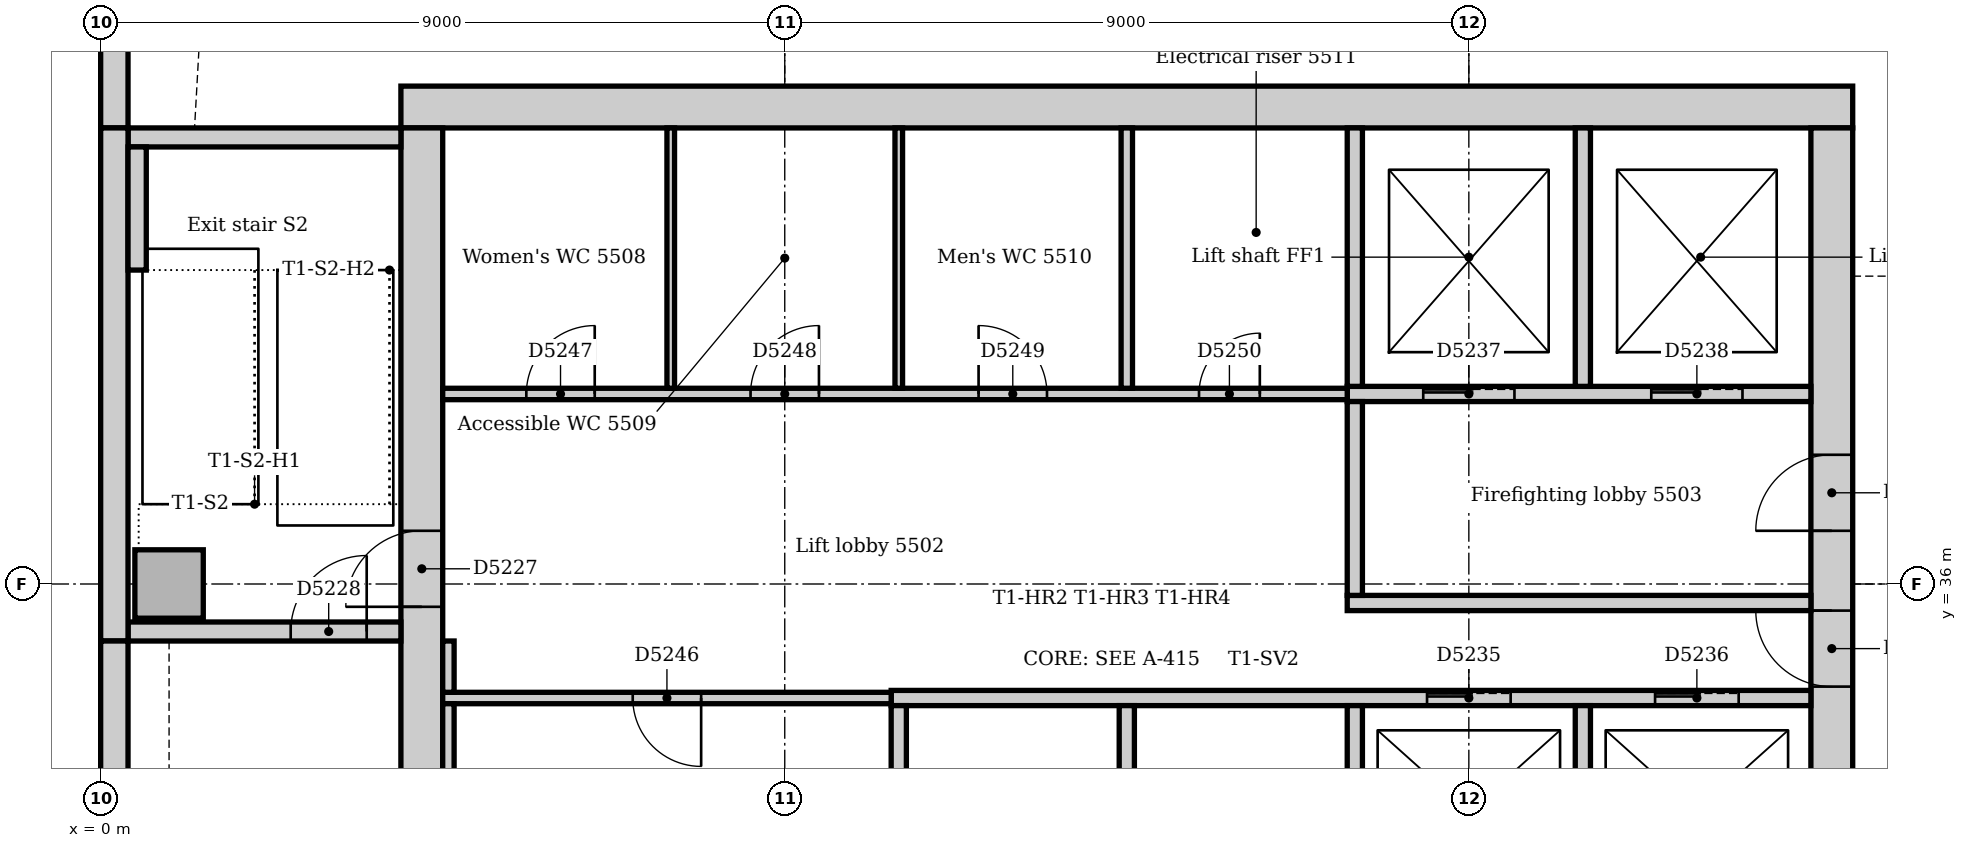
"""IFC4 building model, lengths in metres.
Left out: names, types, materials, properties, quantities, classifications, styles, units other than length and angle.
Written with IfcOpenShell. Run it as: python <this file> out.ifc"""

import sys

from ifc_helpers import new_model, si_unit, direction, frame, frame_2d, origin, origin_2d, place, context, subcontext, project, spatial, rectangle, extrude, element, fill, save


model = new_model("IFC4")
c1 = context("Model", 3, precision=1e-05, world=origin(), true_north=direction((0.0, 1.0)))
c2 = subcontext(c1, "Body", "Model", "MODEL_VIEW")
j1 = project(units=[si_unit("LENGTHUNIT", "METRE"), si_unit("PLANEANGLEUNIT", "RADIAN")], contexts=[c1])
p1 = place(None, origin())
s1 = spatial("IfcSite", under=j1, at=p1, CompositionType="ELEMENT")
p2 = place(p1, origin())
s2 = spatial("IfcBuilding", under=s1, at=p2, CompositionType="ELEMENT")
p3 = place(p2, frame((0.0, 0.0, 230.0)))
s3 = spatial("IfcBuildingStorey", under=s2, at=p3, CompositionType="ELEMENT", Elevation=230.0)
p4 = place(p3, frame((23.05, 42.275, 0.0), z_axis=(0.0, 0.0, 1.0), x_axis=(-1.0, 0.0, 0.0)))
e1 = element("IfcWall", 1, at=p4, inside=s3, PredefinedType="SOLIDWALL", context=c2, shape_type="SweptSolid", body=[
    extrude(rectangle(XDim=19.1, YDim=0.55, at=frame_2d((9.55, 0.0))), origin(), (0.0, 0.0, 1.0), 4.0),
])
p5 = place(p3, frame((22.775, 31.5, 0.0), z_axis=(0.0, 0.0, 1.0), x_axis=(0.0, 1.0, 0.0)))
e2 = element("IfcWall", 2, at=p5, inside=s3, PredefinedType="SOLIDWALL", context=c2, shape_type="SweptSolid", body=[
    extrude(rectangle(XDim=10.5, YDim=0.55, at=frame_2d((5.25, 0.0))), origin(), (0.0, 0.0, 1.0), 4.0),
])
p6 = place(p5, frame((3.15, 0.0, 0.0)))
e3 = element("IfcOpeningElement", 3, at=p6, cuts=e2, PredefinedType="OPENING", context=c2, shape_type="SweptSolid", body=[
    extrude(rectangle(XDim=1.0, YDim=2.1, at=frame_2d((0.5, 1.05))), frame((0.0, 0.285, 0.0), z_axis=(0.0, -1.0, 0.0), x_axis=(1.0, 0.0, 0.0)), (0.0, 0.0, 1.0), 0.57),
])
p7 = place(p5, frame((5.2, 0.0, 0.0)))
e4 = element("IfcOpeningElement", 4, at=p7, cuts=e2, PredefinedType="OPENING", context=c2, shape_type="SweptSolid", body=[
    extrude(rectangle(XDim=1.0, YDim=2.1, at=frame_2d((0.5, 1.05))), frame((0.0, 0.285, 0.0), z_axis=(0.0, -1.0, 0.0), x_axis=(1.0, 0.0, 0.0)), (0.0, 0.0, 1.0), 0.57),
])
p8 = place(p3, frame((4.225, 42.0, 0.0), z_axis=(0.0, 0.0, 1.0), x_axis=(0.0, -1.0, 0.0)))
e5 = element("IfcWall", 5, at=p8, inside=s3, PredefinedType="SOLIDWALL", context=c2, shape_type="SweptSolid", body=[
    extrude(rectangle(XDim=10.5, YDim=0.55, at=frame_2d((5.25, 0.0))), origin(), (0.0, 0.0, 1.0), 4.0),
])
p9 = place(p8, frame((5.3, 0.0, 0.0)))
e6 = element("IfcOpeningElement", 6, at=p9, cuts=e5, PredefinedType="OPENING", context=c2, shape_type="SweptSolid", body=[
    extrude(rectangle(XDim=1.0, YDim=2.1, at=frame_2d((0.5, 1.05))), frame((0.0, 0.285, 0.0), z_axis=(0.0, -1.0, 0.0), x_axis=(1.0, 0.0, 0.0)), (0.0, 0.0, 1.0), 0.57),
])
p10 = place(p3, frame((0.36, 35.375, 0.0), z_axis=(0.0, 0.0, 1.0), x_axis=(1.0, 0.0, 0.0)))
e7 = element("IfcWall", 7, at=p10, inside=s3, PredefinedType="SOLIDWALL", context=c2, shape_type="SweptSolid", body=[
    extrude(rectangle(XDim=3.59, YDim=0.25, at=frame_2d((1.795, 0.0))), origin(), (0.0, 0.0, 1.0), 4.0),
])
p11 = place(p10, frame((2.14, 0.0, 0.0)))
e8 = element("IfcOpeningElement", 8, at=p11, cuts=e7, PredefinedType="OPENING", context=c2, shape_type="SweptSolid", body=[
    extrude(rectangle(XDim=1.0, YDim=2.1, at=frame_2d((0.5, 1.05))), frame((0.0, 0.135, 0.0), z_axis=(0.0, -1.0, 0.0), x_axis=(1.0, 0.0, 0.0)), (0.0, 0.0, 1.0), 0.27),
])
p12 = place(p3, frame((3.95, 41.875, 0.0), z_axis=(0.0, 0.0, 1.0), x_axis=(-1.0, 0.0, 0.0)))
e9 = element("IfcWall", 9, at=p12, inside=s3, PredefinedType="SOLIDWALL", context=c2, shape_type="SweptSolid", body=[
    extrude(rectangle(XDim=3.59, YDim=0.25, at=frame_2d((1.795, 0.0))), origin(), (0.0, 0.0, 1.0), 4.0),
])
p13 = place(p3, frame((0.9, 36.0, 0.0), z_axis=(0.0, 0.0, 1.0), x_axis=(1.0, 0.0, 0.0)))
e10 = element("IfcColumn", 10, at=p13, inside=s3, PredefinedType="COLUMN", context=c2, shape_type="SweptSolid", body=[
    extrude(rectangle(XDim=0.9, YDim=0.9, at=origin_2d()), origin(), (0.0, 0.0, 1.0), 4.0),
])
p14 = place(p3, frame((0.18, 54.257, 0.0), z_axis=(0.0, 0.0, 1.0), x_axis=(0.0, -1.0, 0.0)))
e11 = element("IfcWall", 11, at=p14, inside=s3, PredefinedType="STANDARD", context=c2, shape_type="SweptSolid", body=[
    extrude(rectangle(XDim=12.257, YDim=0.36, at=frame_2d((6.129, 0.0))), origin(), (0.0, 0.0, 1.0), 3.85),
])
p15 = place(p14, frame((3.107, 0.0, 0.9)))
e12 = element("IfcOpeningElement", 12, at=p15, cuts=e11, PredefinedType="OPENING", context=c2, shape_type="SweptSolid", body=[
    extrude(rectangle(XDim=3.3, YDim=1.6, at=frame_2d((1.65, 0.8))), frame((0.0, 0.19, 0.0), z_axis=(0.0, -1.0, 0.0), x_axis=(1.0, 0.0, 0.0)), (0.0, 0.0, 1.0), 0.38),
])
p16 = place(p14, frame((7.607, 0.0, 0.9)))
e13 = element("IfcOpeningElement", 13, at=p16, cuts=e11, PredefinedType="OPENING", context=c2, shape_type="SweptSolid", body=[
    extrude(rectangle(XDim=3.3, YDim=1.6, at=frame_2d((1.65, 0.8))), frame((0.0, 0.19, 0.0), z_axis=(0.0, -1.0, 0.0), x_axis=(1.0, 0.0, 0.0)), (0.0, 0.0, 1.0), 0.38),
])
p17 = place(p3, frame((0.18, 42.0, 0.0), z_axis=(0.0, 0.0, 1.0), x_axis=(0.0, -1.0, 0.0)))
e14 = element("IfcWall", 14, at=p17, inside=s3, PredefinedType="STANDARD", context=c2, shape_type="SweptSolid", body=[
    extrude(rectangle(XDim=6.75, YDim=0.36, at=frame_2d((3.375, 0.0))), origin(), (0.0, 0.0, 1.0), 3.85),
])
p18 = place(p3, frame((0.18, 35.25, 0.0), z_axis=(0.0, 0.0, 1.0), x_axis=(0.0, -1.0, 0.0)))
e15 = element("IfcWall", 15, at=p18, inside=s3, PredefinedType="STANDARD", context=c2, shape_type="SweptSolid", body=[
    extrude(rectangle(XDim=7.5, YDim=0.36, at=frame_2d((3.75, 0.0))), origin(), (0.0, 0.0, 1.0), 3.85),
])
p19 = place(p3, frame((0.48, 40.13, 0.0), z_axis=(0.0, 0.0, 1.0), x_axis=(0.0, 1.0, 0.0)))
e16 = element("IfcWall", 16, at=p19, inside=s3, PredefinedType="STANDARD", context=c2, shape_type="SweptSolid", body=[
    extrude(rectangle(XDim=1.62, YDim=0.24, at=frame_2d((0.81, 0.0))), origin(), (0.0, 0.0, 1.0), 4.0),
])
p20 = place(p3, frame((16.4, 35.75, 0.0), z_axis=(0.0, 0.0, 1.0), x_axis=(1.0, 0.0, 0.0)))
e17 = element("IfcWall", 17, at=p20, inside=s3, PredefinedType="PARTITIONING", context=c2, shape_type="SweptSolid", body=[
    extrude(rectangle(XDim=6.1, YDim=0.2, at=frame_2d((3.05, 0.0))), origin(), (0.0, 0.0, 1.0), 3.85),
])
p21 = place(p3, frame((16.4, 38.5, 0.0), z_axis=(0.0, 0.0, 1.0), x_axis=(1.0, 0.0, 0.0)))
e18 = element("IfcWall", 18, at=p21, inside=s3, PredefinedType="PARTITIONING", context=c2, shape_type="SweptSolid", body=[
    extrude(rectangle(XDim=6.1, YDim=0.2, at=frame_2d((3.05, 0.0))), origin(), (0.0, 0.0, 1.0), 3.85),
])
p22 = place(p21, frame((1.0, 0.0, 0.0)))
e19 = element("IfcOpeningElement", 19, at=p22, cuts=e18, PredefinedType="OPENING", context=c2, shape_type="SweptSolid", body=[
    extrude(rectangle(XDim=1.2, YDim=2.1, at=frame_2d((0.6, 1.05))), frame((0.0, 0.11, 0.0), z_axis=(0.0, -1.0, 0.0), x_axis=(1.0, 0.0, 0.0)), (0.0, 0.0, 1.0), 0.22),
])
p23 = place(p21, frame((4.0, 0.0, 0.0)))
e20 = element("IfcOpeningElement", 20, at=p23, cuts=e18, PredefinedType="OPENING", context=c2, shape_type="SweptSolid", body=[
    extrude(rectangle(XDim=1.2, YDim=2.1, at=frame_2d((0.6, 1.05))), frame((0.0, 0.11, 0.0), z_axis=(0.0, -1.0, 0.0), x_axis=(1.0, 0.0, 0.0)), (0.0, 0.0, 1.0), 0.22),
])
p24 = place(p3, frame((16.5, 35.85, 0.0), z_axis=(0.0, 0.0, 1.0), x_axis=(0.0, 1.0, 0.0)))
e21 = element("IfcWall", 21, at=p24, inside=s3, PredefinedType="PARTITIONING", context=c2, shape_type="SweptSolid", body=[
    extrude(rectangle(XDim=2.55, YDim=0.2, at=frame_2d((1.275, 0.0))), origin(), (0.0, 0.0, 1.0), 3.85),
])
p25 = place(p3, frame((10.4, 34.5, 0.0), z_axis=(0.0, 0.0, 1.0), x_axis=(1.0, 0.0, 0.0)))
e22 = element("IfcWall", 22, at=p25, inside=s3, PredefinedType="PARTITIONING", context=c2, shape_type="SweptSolid", body=[
    extrude(rectangle(XDim=12.1, YDim=0.2, at=frame_2d((6.05, 0.0))), origin(), (0.0, 0.0, 1.0), 3.85),
])
p26 = place(p25, frame((7.05, 0.0, 0.0)))
e23 = element("IfcOpeningElement", 23, at=p26, cuts=e22, PredefinedType="OPENING", context=c2, shape_type="SweptSolid", body=[
    extrude(rectangle(XDim=1.1, YDim=2.1, at=frame_2d((0.55, 1.05))), frame((0.0, 0.11, 0.0), z_axis=(0.0, -1.0, 0.0), x_axis=(1.0, 0.0, 0.0)), (0.0, 0.0, 1.0), 0.22),
])
p27 = place(p25, frame((10.05, 0.0, 0.0)))
e24 = element("IfcOpeningElement", 24, at=p27, cuts=e22, PredefinedType="OPENING", context=c2, shape_type="SweptSolid", body=[
    extrude(rectangle(XDim=1.1, YDim=2.1, at=frame_2d((0.55, 1.05))), frame((0.0, 0.11, 0.0), z_axis=(0.0, -1.0, 0.0), x_axis=(1.0, 0.0, 0.0)), (0.0, 0.0, 1.0), 0.22),
])
for number, where, z_axis, x_axis in (
    (25, (10.5, 31.75, 0.0), (0.0, 0.0, 1.0), (0.0, 1.0, 0.0)),
    (26, (13.5, 31.75, 0.0), (0.0, 0.0, 1.0), (0.0, 1.0, 0.0)),
    (27, (16.5, 31.75, 0.0), (0.0, 0.0, 1.0), (0.0, 1.0, 0.0)),
    (28, (19.5, 31.75, 0.0), (0.0, 0.0, 1.0), (0.0, 1.0, 0.0)),
):
    element("IfcWall", number, at=place(p3, frame(where, z_axis=z_axis, x_axis=x_axis)), inside=s3, PredefinedType="PARTITIONING", context=c2, shape_type="SweptSolid", body=[
        extrude(rectangle(XDim=2.65, YDim=0.2, at=frame_2d((1.325, 0.0))), origin(), (0.0, 0.0, 1.0), 3.85),
    ])
for number, where, z_axis, x_axis in (
    (29, (16.5, 38.6, 0.0), (0.0, 0.0, 1.0), (0.0, 1.0, 0.0)),
    (30, (19.5, 38.6, 0.0), (0.0, 0.0, 1.0), (0.0, 1.0, 0.0)),
):
    element("IfcWall", number, at=place(p3, frame(where, z_axis=z_axis, x_axis=x_axis)), inside=s3, PredefinedType="PARTITIONING", context=c2, shape_type="SweptSolid", body=[
        extrude(rectangle(XDim=3.4, YDim=0.2, at=frame_2d((1.7, 0.0))), origin(), (0.0, 0.0, 1.0), 3.85),
    ])
p28 = place(p3, frame((4.5, 38.5, 0.0), z_axis=(0.0, 0.0, 1.0), x_axis=(1.0, 0.0, 0.0)))
e31 = element("IfcWall", 31, at=p28, inside=s3, PredefinedType="PARTITIONING", context=c2, shape_type="SweptSolid", body=[
    extrude(rectangle(XDim=11.9, YDim=0.15, at=frame_2d((5.95, 0.0))), origin(), (0.0, 0.0, 1.0), 3.85),
])
p29 = place(p28, frame((1.1, 0.0, 0.0)))
e32 = element("IfcOpeningElement", 32, at=p29, cuts=e31, PredefinedType="OPENING", context=c2, shape_type="SweptSolid", body=[
    extrude(rectangle(XDim=0.9, YDim=2.1, at=frame_2d((0.45, 1.05))), frame((0.0, 0.085, 0.0), z_axis=(0.0, -1.0, 0.0), x_axis=(1.0, 0.0, 0.0)), (0.0, 0.0, 1.0), 0.17),
])
p30 = place(p28, frame((4.05, 0.0, 0.0)))
e33 = element("IfcOpeningElement", 33, at=p30, cuts=e31, PredefinedType="OPENING", context=c2, shape_type="SweptSolid", body=[
    extrude(rectangle(XDim=0.9, YDim=2.1, at=frame_2d((0.45, 1.05))), frame((0.0, 0.085, 0.0), z_axis=(0.0, -1.0, 0.0), x_axis=(1.0, 0.0, 0.0)), (0.0, 0.0, 1.0), 0.17),
])
p31 = place(p28, frame((7.05, 0.0, 0.0)))
e34 = element("IfcOpeningElement", 34, at=p31, cuts=e31, PredefinedType="OPENING", context=c2, shape_type="SweptSolid", body=[
    extrude(rectangle(XDim=0.9, YDim=2.1, at=frame_2d((0.45, 1.05))), frame((0.0, 0.085, 0.0), z_axis=(0.0, -1.0, 0.0), x_axis=(1.0, 0.0, 0.0)), (0.0, 0.0, 1.0), 0.17),
])
p32 = place(p28, frame((9.95, 0.0, 0.0)))
e35 = element("IfcOpeningElement", 35, at=p32, cuts=e31, PredefinedType="OPENING", context=c2, shape_type="SweptSolid", body=[
    extrude(rectangle(XDim=0.8, YDim=2.1, at=frame_2d((0.4, 1.05))), frame((0.0, 0.085, 0.0), z_axis=(0.0, -1.0, 0.0), x_axis=(1.0, 0.0, 0.0)), (0.0, 0.0, 1.0), 0.17),
])
p33 = place(p3, frame((4.5, 34.5, 0.0), z_axis=(0.0, 0.0, 1.0), x_axis=(1.0, 0.0, 0.0)))
e36 = element("IfcWall", 36, at=p33, inside=s3, PredefinedType="PARTITIONING", context=c2, shape_type="SweptSolid", body=[
    extrude(rectangle(XDim=5.9, YDim=0.15, at=frame_2d((2.95, 0.0))), origin(), (0.0, 0.0, 1.0), 3.85),
])
p34 = place(p33, frame((2.5, 0.0, 0.0)))
e37 = element("IfcOpeningElement", 37, at=p34, cuts=e36, PredefinedType="OPENING", context=c2, shape_type="SweptSolid", body=[
    extrude(rectangle(XDim=0.9, YDim=2.1, at=frame_2d((0.45, 1.05))), frame((0.0, 0.085, 0.0), z_axis=(0.0, -1.0, 0.0), x_axis=(1.0, 0.0, 0.0)), (0.0, 0.0, 1.0), 0.17),
])
p35 = place(p3, frame((4.575, 34.575, 0.0), z_axis=(0.0, 0.0, 1.0), x_axis=(0.0, 1.0, 0.0)))
e38 = element("IfcWall", 38, at=p35, inside=s3, PredefinedType="PARTITIONING", context=c2, shape_type="SweptSolid", body=[
    extrude(rectangle(XDim=0.675, YDim=0.15, at=frame_2d((0.338, 0.0))), origin(), (0.0, 0.0, 1.0), 3.85),
])
p36 = place(p3, frame((4.575, 31.75, 0.0), z_axis=(0.0, 0.0, 1.0), x_axis=(0.0, 1.0, 0.0)))
e39 = element("IfcWall", 39, at=p36, inside=s3, PredefinedType="PARTITIONING", context=c2, shape_type="SweptSolid", body=[
    extrude(rectangle(XDim=2.675, YDim=0.15, at=frame_2d((1.337, 0.0))), origin(), (0.0, 0.0, 1.0), 3.85),
])
p37 = place(p3, frame((13.5, 38.575, 0.0), z_axis=(0.0, 0.0, 1.0), x_axis=(0.0, 1.0, 0.0)))
e40 = element("IfcWall", 40, at=p37, inside=s3, PredefinedType="PARTITIONING", context=c2, shape_type="SweptSolid", body=[
    extrude(rectangle(XDim=3.425, YDim=0.15, at=frame_2d((1.712, 0.0))), origin(), (0.0, 0.0, 1.0), 3.85),
])
for number, where, z_axis, x_axis in (
    (41, (7.5, 38.575, 0.0), (0.0, 0.0, 1.0), (0.0, 1.0, 0.0)),
    (42, (10.5, 38.575, 0.0), (0.0, 0.0, 1.0), (0.0, 1.0, 0.0)),
):
    element("IfcWall", number, at=place(p3, frame(where, z_axis=z_axis, x_axis=x_axis)), inside=s3, PredefinedType="PARTITIONING", context=c2, shape_type="SweptSolid", body=[
        extrude(rectangle(XDim=3.425, YDim=0.1, at=frame_2d((1.712, 0.0))), origin(), (0.0, 0.0, 1.0), 3.85),
    ])
p38 = place(p9, frame((1.0, 0.0, 0.0), z_axis=(0.0, 0.0, 1.0), x_axis=(-1.0, 0.0, 0.0)))
e43 = element("IfcDoor", 43, at=p38, inside=s3, OperationType="SINGLE_SWING_LEFT", PredefinedType="DOOR", context=c2, shape_type="SweptSolid", body=[
    extrude(rectangle(XDim=1.0, YDim=2.1, at=frame_2d((0.5, 1.05))), frame((0.0, 0.025, 0.0), z_axis=(0.0, -1.0, 0.0), x_axis=(1.0, 0.0, 0.0)), (0.0, 0.0, 1.0), 0.05),
])
fill(e6, e43)
p39 = place(p11, origin())
e44 = element("IfcDoor", 44, at=p39, inside=s3, OperationType="SINGLE_SWING_RIGHT", PredefinedType="DOOR", context=c2, shape_type="SweptSolid", body=[
    extrude(rectangle(XDim=1.0, YDim=2.1, at=frame_2d((0.5, 1.05))), frame((0.0, 0.025, 0.0), z_axis=(0.0, -1.0, 0.0), x_axis=(1.0, 0.0, 0.0)), (0.0, 0.0, 1.0), 0.05),
])
fill(e8, e44)
p40 = place(p26, origin())
e45 = element("IfcDoor", 45, at=p40, inside=s3, OperationType="SLIDING_TO_LEFT", PredefinedType="DOOR", context=c2, shape_type="SweptSolid", body=[
    extrude(rectangle(XDim=1.1, YDim=2.1, at=frame_2d((0.55, 1.05))), frame((0.0, 0.025, 0.0), z_axis=(0.0, -1.0, 0.0), x_axis=(1.0, 0.0, 0.0)), (0.0, 0.0, 1.0), 0.05),
])
fill(e23, e45)
p41 = place(p27, origin())
e46 = element("IfcDoor", 46, at=p41, inside=s3, OperationType="SLIDING_TO_LEFT", PredefinedType="DOOR", context=c2, shape_type="SweptSolid", body=[
    extrude(rectangle(XDim=1.1, YDim=2.1, at=frame_2d((0.55, 1.05))), frame((0.0, 0.025, 0.0), z_axis=(0.0, -1.0, 0.0), x_axis=(1.0, 0.0, 0.0)), (0.0, 0.0, 1.0), 0.05),
])
fill(e24, e46)
p42 = place(p22, origin())
e47 = element("IfcDoor", 47, at=p42, inside=s3, OperationType="SLIDING_TO_LEFT", PredefinedType="DOOR", context=c2, shape_type="SweptSolid", body=[
    extrude(rectangle(XDim=1.2, YDim=2.1, at=frame_2d((0.6, 1.05))), frame((0.0, 0.025, 0.0), z_axis=(0.0, -1.0, 0.0), x_axis=(1.0, 0.0, 0.0)), (0.0, 0.0, 1.0), 0.05),
])
fill(e19, e47)
p43 = place(p23, origin())
e48 = element("IfcDoor", 48, at=p43, inside=s3, OperationType="SLIDING_TO_LEFT", PredefinedType="DOOR", context=c2, shape_type="SweptSolid", body=[
    extrude(rectangle(XDim=1.2, YDim=2.1, at=frame_2d((0.6, 1.05))), frame((0.0, 0.025, 0.0), z_axis=(0.0, -1.0, 0.0), x_axis=(1.0, 0.0, 0.0)), (0.0, 0.0, 1.0), 0.05),
])
fill(e20, e48)
p44 = place(p6, origin())
e49 = element("IfcDoor", 49, at=p44, inside=s3, OperationType="SINGLE_SWING_RIGHT", PredefinedType="DOOR", context=c2, shape_type="SweptSolid", body=[
    extrude(rectangle(XDim=1.0, YDim=2.1, at=frame_2d((0.5, 1.05))), frame((0.0, 0.025, 0.0), z_axis=(0.0, -1.0, 0.0), x_axis=(1.0, 0.0, 0.0)), (0.0, 0.0, 1.0), 0.05),
])
fill(e3, e49)
p45 = place(p7, origin())
e50 = element("IfcDoor", 50, at=p45, inside=s3, OperationType="SINGLE_SWING_LEFT", PredefinedType="DOOR", context=c2, shape_type="SweptSolid", body=[
    extrude(rectangle(XDim=1.0, YDim=2.1, at=frame_2d((0.5, 1.05))), frame((0.0, 0.025, 0.0), z_axis=(0.0, -1.0, 0.0), x_axis=(1.0, 0.0, 0.0)), (0.0, 0.0, 1.0), 0.05),
])
fill(e4, e50)
p46 = place(p34, frame((0.9, 0.0, 0.0), z_axis=(0.0, 0.0, 1.0), x_axis=(-1.0, 0.0, 0.0)))
e51 = element("IfcDoor", 51, at=p46, inside=s3, OperationType="SINGLE_SWING_LEFT", PredefinedType="DOOR", context=c2, shape_type="SweptSolid", body=[
    extrude(rectangle(XDim=0.9, YDim=2.1, at=frame_2d((0.45, 1.05))), frame((0.0, 0.025, 0.0), z_axis=(0.0, -1.0, 0.0), x_axis=(1.0, 0.0, 0.0)), (0.0, 0.0, 1.0), 0.05),
])
fill(e37, e51)
p47 = place(p29, origin())
e52 = element("IfcDoor", 52, at=p47, inside=s3, OperationType="SINGLE_SWING_RIGHT", PredefinedType="DOOR", context=c2, shape_type="SweptSolid", body=[
    extrude(rectangle(XDim=0.9, YDim=2.1, at=frame_2d((0.45, 1.05))), frame((0.0, 0.025, 0.0), z_axis=(0.0, -1.0, 0.0), x_axis=(1.0, 0.0, 0.0)), (0.0, 0.0, 1.0), 0.05),
])
fill(e32, e52)
p48 = place(p30, origin())
e53 = element("IfcDoor", 53, at=p48, inside=s3, OperationType="SINGLE_SWING_RIGHT", PredefinedType="DOOR", context=c2, shape_type="SweptSolid", body=[
    extrude(rectangle(XDim=0.9, YDim=2.1, at=frame_2d((0.45, 1.05))), frame((0.0, 0.025, 0.0), z_axis=(0.0, -1.0, 0.0), x_axis=(1.0, 0.0, 0.0)), (0.0, 0.0, 1.0), 0.05),
])
fill(e33, e53)
p49 = place(p31, origin())
e54 = element("IfcDoor", 54, at=p49, inside=s3, OperationType="SINGLE_SWING_LEFT", PredefinedType="DOOR", context=c2, shape_type="SweptSolid", body=[
    extrude(rectangle(XDim=0.9, YDim=2.1, at=frame_2d((0.45, 1.05))), frame((0.0, 0.025, 0.0), z_axis=(0.0, -1.0, 0.0), x_axis=(1.0, 0.0, 0.0)), (0.0, 0.0, 1.0), 0.05),
])
fill(e34, e54)
p50 = place(p32, origin())
e55 = element("IfcDoor", 55, at=p50, inside=s3, OperationType="SINGLE_SWING_RIGHT", PredefinedType="DOOR", context=c2, shape_type="SweptSolid", body=[
    extrude(rectangle(XDim=0.8, YDim=2.1, at=frame_2d((0.4, 1.05))), frame((0.0, 0.025, 0.0), z_axis=(0.0, -1.0, 0.0), x_axis=(1.0, 0.0, 0.0)), (0.0, 0.0, 1.0), 0.05),
])
fill(e35, e55)
save(model, sys.argv[1])
